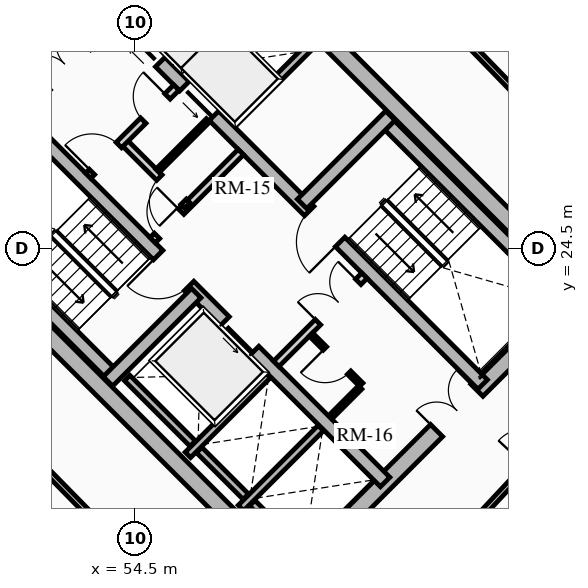
"""IFC4 building model, lengths in metres.
Left out: names, types, materials, properties, quantities, classifications, styles, units other than length and angle.
Written with IfcOpenShell. Run it as: python <this file> out.ifc"""

import sys

from ifc_helpers import new_model, si_unit, direction, frame, frame_2d, origin, place, context, subcontext, project, spatial, rectangle, extrude, source, transform, mapped, element, fill, save


model = new_model("IFC4")
c1 = context("Model", 3, precision=1e-05, world=origin(), true_north=direction((0.0, 1.0)))
c2 = subcontext(c1, "Body", "Model", "MODEL_VIEW")
j1 = project(units=[si_unit("LENGTHUNIT", "METRE"), si_unit("PLANEANGLEUNIT", "RADIAN")], contexts=[c1])
p1 = place(None, origin())
s1 = spatial("IfcSite", under=j1, at=p1, CompositionType="ELEMENT")
p2 = place(p1, origin())
s2 = spatial("IfcBuilding", under=s1, at=p2, CompositionType="ELEMENT")
p3 = place(p2, frame((0.0, 0.0, 75.97)))
s3 = spatial("IfcBuildingStorey", under=s2, at=p3, CompositionType="ELEMENT", Elevation=75.97)
for number, where, z_axis, x_axis in (
    (1, (58.737, 15.697, 0.0), (0.0, 0.0, 1.0), (-0.707, 0.707, 0.0)),
    (2, (66.303, 23.263, 0.0), (0.0, 0.0, 1.0), (-0.707, 0.707, 0.0)),
):
    element("IfcWall", number, at=place(p3, frame(where, z_axis=z_axis, x_axis=x_axis)), inside=s3, PredefinedType="SHEAR", context=c2, shape_type="SweptSolid", body=[
        extrude(rectangle(XDim=14.2, YDim=0.45, at=frame_2d((7.1, 0.0))), origin(), (0.0, 0.0, 1.0), 2.91),
    ])
p4 = place(p3, frame((58.578, 15.856, 0.0), z_axis=(0.0, 0.0, 1.0), x_axis=(0.707106781187, 0.707106781187, 0.0)))
e3 = element("IfcWall", 3, at=p4, inside=s3, PredefinedType="SHEAR", context=c2, shape_type="SweptSolid", body=[
    extrude(rectangle(XDim=10.7, YDim=0.45, at=frame_2d((5.35, 0.0))), origin(), (0.0, 0.0, 1.0), 2.91),
])
m1 = source(origin(), c2, "Body", "SweptSolid", [
    extrude(rectangle(XDim=1.5, YDim=2.02, at=frame_2d((0.75, 1.01))), frame((0.0, 0.235, 0.0), z_axis=(0.0, -1.0, 0.0), x_axis=(1.0, 0.0, 0.0)), (0.0, 0.0, 1.0), 0.47),
])
p5 = place(p4, frame((5.45, 0.0, 0.0)))
e4 = element("IfcOpeningElement", 4, at=p5, cuts=e3, PredefinedType="OPENING", context=c2, shape_type="MappedRepresentation", body=[
    mapped(m1, transform((0.0, 0.0, 0.0), x_axis=(1.0, 0.0, 0.0), y_axis=(0.0, 1.0, 0.0), z_axis=(0.0, 0.0, 1.0), scale=1.0)),
])
p6 = place(p3, frame((48.856, 25.578, 0.0), z_axis=(0.0, 0.0, 1.0), x_axis=(0.707106781187, 0.707106781187, 0.0)))
e5 = element("IfcWall", 5, at=p6, inside=s3, PredefinedType="SHEAR", context=c2, shape_type="SweptSolid", body=[
    extrude(rectangle(XDim=10.7, YDim=0.45, at=frame_2d((5.35, 0.0))), origin(), (0.0, 0.0, 1.0), 2.91),
])
p7 = place(p6, frame((4.6, 0.0, 0.0)))
e6 = element("IfcOpeningElement", 6, at=p7, cuts=e5, PredefinedType="OPENING", context=c2, shape_type="MappedRepresentation", body=[
    mapped(m1, transform((0.0, 0.0, 0.0), x_axis=(1.0, 0.0, 0.0), y_axis=(0.0, 1.0, 0.0), z_axis=(0.0, 0.0, 1.0), scale=1.0)),
])
p8 = place(p3, frame((61.078, 18.355, 0.0), z_axis=(0.0, 0.0, 1.0), x_axis=(-0.707106781187, 0.707106781187, 0.0)))
e7 = element("IfcWall", 7, at=p8, inside=s3, PredefinedType="SHEAR", context=c2, shape_type="SweptSolid", body=[
    extrude(rectangle(XDim=13.75, YDim=0.35, at=frame_2d((6.875, 0.0))), origin(), (0.0, 0.0, 1.0), 2.91),
])
m2 = source(origin(), c2, "Body", "SweptSolid", [
    extrude(rectangle(XDim=1.1, YDim=2.015, at=frame_2d((0.55, 1.007))), frame((0.0, 0.185, 0.0), z_axis=(0.0, -1.0, 0.0), x_axis=(1.0, 0.0, 0.0)), (0.0, 0.0, 1.0), 0.37),
])
p9 = place(p8, frame((4.875, 0.0, 0.0)))
e8 = element("IfcOpeningElement", 8, at=p9, cuts=e7, PredefinedType="OPENING", context=c2, shape_type="MappedRepresentation", body=[
    mapped(m2, transform((0.0, 0.0, 0.0), x_axis=(1.0, 0.0, 0.0), y_axis=(0.0, 1.0, 0.0), z_axis=(0.0, 0.0, 1.0), scale=1.0)),
])
m3 = source(origin(), c2, "Body", "SweptSolid", [
    extrude(rectangle(XDim=1.15, YDim=2.02, at=frame_2d((0.575, 1.01))), frame((0.0, 0.185, 0.0), z_axis=(0.0, -1.0, 0.0), x_axis=(1.0, 0.0, 0.0)), (0.0, 0.0, 1.0), 0.37),
])
p10 = place(p8, frame((7.295, 0.0, 0.0)))
e9 = element("IfcOpeningElement", 9, at=p10, cuts=e7, PredefinedType="OPENING", context=c2, shape_type="MappedRepresentation", body=[
    mapped(m3, transform((0.0, 0.0, 0.0), x_axis=(1.0, 0.0, 0.0), y_axis=(0.0, 1.0, 0.0), z_axis=(0.0, 0.0, 1.0), scale=1.0)),
])
p11 = place(p3, frame((63.645, 20.922, 0.0), z_axis=(0.0, 0.0, 1.0), x_axis=(-0.707106781187, 0.707106781187, 0.0)))
e10 = element("IfcWall", 10, at=p11, inside=s3, PredefinedType="SHEAR", context=c2, shape_type="SweptSolid", body=[
    extrude(rectangle(XDim=13.75, YDim=0.35, at=frame_2d((6.875, 0.0))), origin(), (0.0, 0.0, 1.0), 2.91),
])
p12 = place(p11, frame((10.0, 0.0, 0.0)))
e11 = element("IfcOpeningElement", 11, at=p12, cuts=e10, PredefinedType="OPENING", context=c2, shape_type="MappedRepresentation", body=[
    mapped(m2, transform((0.0, 0.0, 0.0), x_axis=(1.0, 0.0, 0.0), y_axis=(0.0, 1.0, 0.0), z_axis=(0.0, 0.0, 1.0), scale=1.0)),
])
p13 = place(p11, frame((12.0, 0.0, 0.0)))
e12 = element("IfcOpeningElement", 12, at=p13, cuts=e10, PredefinedType="OPENING", context=c2, shape_type="MappedRepresentation", body=[
    mapped(m2, transform((0.0, 0.0, 0.0), x_axis=(1.0, 0.0, 0.0), y_axis=(0.0, 1.0, 0.0), z_axis=(0.0, 0.0, 1.0), scale=1.0)),
])
p14 = place(p11, frame((5.305, 0.0, 0.0)))
e13 = element("IfcOpeningElement", 13, at=p14, cuts=e10, PredefinedType="OPENING", context=c2, shape_type="MappedRepresentation", body=[
    mapped(m3, transform((0.0, 0.0, 0.0), x_axis=(1.0, 0.0, 0.0), y_axis=(0.0, 1.0, 0.0), z_axis=(0.0, 0.0, 1.0), scale=1.0)),
])
p15 = place(p3, frame((53.922, 21.141, 0.0), z_axis=(0.0, 0.0, 1.0), x_axis=(-0.707088616009, 0.707124945897, 0.0)))
e14 = element("IfcWall", 14, at=p15, inside=s3, PredefinedType="SHEAR", context=c2, shape_type="SweptSolid", body=[
    extrude(rectangle(XDim=6.72, YDim=0.35, at=frame_2d((3.36, 0.0))), origin(), (0.0, 0.0, 1.0), 2.91),
])
p16 = place(p3, frame((53.784, 21.003, 0.0), z_axis=(0.0, 0.0, 1.0), x_axis=(0.707106781187, 0.707106781187, 0.0)))
e15 = element("IfcWall", 15, at=p16, inside=s3, PredefinedType="SHEAR", context=c2, shape_type="SweptSolid", body=[
    extrude(rectangle(XDim=3.285, YDim=0.35, at=frame_2d((1.643, 0.0))), origin(), (0.0, 0.0, 1.0), 2.91),
])
p17 = place(p3, frame((65.83, 23.107, 0.0), z_axis=(0.0, 0.0, 1.0), x_axis=(-0.707088616009, 0.707124945897, 0.0)))
e16 = element("IfcWall", 16, at=p17, inside=s3, PredefinedType="SHEAR", context=c2, shape_type="SweptSolid", body=[
    extrude(rectangle(XDim=6.72, YDim=0.35, at=frame_2d((3.36, 0.0))), origin(), (0.0, 0.0, 1.0), 2.91),
])
p18 = place(p3, frame((58.893, 25.674, 0.0), z_axis=(0.0, 0.0, 1.0), x_axis=(0.707106781187, 0.707106781187, 0.0)))
e17 = element("IfcWall", 17, at=p18, inside=s3, PredefinedType="SHEAR", context=c2, shape_type="SweptSolid", body=[
    extrude(rectangle(XDim=3.285, YDim=0.35, at=frame_2d((1.643, 0.0))), origin(), (0.0, 0.0, 1.0), 2.91),
])
p19 = place(p3, frame((55.888, 19.069, 0.0), z_axis=(0.0, 0.0, 1.0), x_axis=(0.707106781187, 0.707106781187, 0.0)))
e18 = element("IfcWall", 18, at=p19, inside=s3, PredefinedType="SHEAR", context=c2, shape_type="SweptSolid", body=[
    extrude(rectangle(XDim=2.97, YDim=0.2, at=frame_2d((1.485, 0.0))), origin(), (0.0, 0.0, 1.0), 2.91),
])
p20 = place(p3, frame((56.015, 19.366, 0.0), z_axis=(0.0, 0.0, 1.0), x_axis=(-0.707106781187, 0.707106781187, 0.0)))
e19 = element("IfcWall", 19, at=p20, inside=s3, PredefinedType="SHEAR", context=c2, shape_type="SweptSolid", body=[
    extrude(rectangle(XDim=2.44, YDim=0.2, at=frame_2d((1.22, 0.0))), origin(), (0.0, 0.0, 1.0), 2.91),
])
p21 = place(p3, frame((57.284, 17.673, 0.0), z_axis=(0.0, 0.0, 1.0), x_axis=(0.707147878904, 0.70706568108, 0.0)))
e20 = element("IfcWall", 20, at=p21, inside=s3, PredefinedType="SHEAR", context=c2, shape_type="SweptSolid", body=[
    extrude(rectangle(XDim=2.97, YDim=0.2, at=frame_2d((1.485, 0.0))), origin(), (0.0, 0.0, 1.0), 2.91),
])
p22 = place(p3, frame((57.412, 17.97, 0.0), z_axis=(0.0, 0.0, 1.0), x_axis=(-0.707106781187, 0.707106781187, 0.0)))
e21 = element("IfcWall", 21, at=p22, inside=s3, PredefinedType="SHEAR", context=c2, shape_type="SweptSolid", body=[
    extrude(rectangle(XDim=1.735, YDim=0.2, at=frame_2d((0.867, 0.0))), origin(), (0.0, 0.0, 1.0), 2.91),
])
p23 = place(p3, frame((58.737, 16.644, 0.0), z_axis=(0.0, 0.0, 1.0), x_axis=(-0.707032117043, 0.707181437447, 0.0)))
e22 = element("IfcWall", 22, at=p23, inside=s3, PredefinedType="SHEAR", context=c2, shape_type="SweptSolid", body=[
    extrude(rectangle(XDim=1.635, YDim=0.2, at=frame_2d((0.817, 0.0))), origin(), (0.0, 0.0, 1.0), 2.91),
])
p24 = place(p3, frame((57.062, 27.781, 0.0), z_axis=(0.0, 0.0, 1.0), x_axis=(0.707106781187, 0.707106781187, 0.0)))
e23 = element("IfcWall", 23, at=p24, inside=s3, PredefinedType="SHEAR", context=c2, shape_type="SweptSolid", body=[
    extrude(rectangle(XDim=2.97, YDim=0.2, at=frame_2d((1.485, 0.0))), origin(), (0.0, 0.0, 1.0), 2.91),
])
p25 = place(p3, frame((55.615, 29.227, 0.0), z_axis=(0.0, 0.0, 1.0), x_axis=(0.707147878904, 0.70706568108, 0.0)))
e24 = element("IfcWall", 24, at=p25, inside=s3, PredefinedType="SHEAR", context=c2, shape_type="SweptSolid", body=[
    extrude(rectangle(XDim=2.97, YDim=0.2, at=frame_2d((1.485, 0.0))), origin(), (0.0, 0.0, 1.0), 2.91),
])
p26 = place(p3, frame((58.214, 21.467, 0.0), z_axis=(0.0, 0.0, 1.0), x_axis=(0.707106781187, 0.707106781187, 0.0)))
e25 = element("IfcWall", 25, at=p26, inside=s3, PredefinedType="PARTITIONING", context=c2, shape_type="SweptSolid", body=[
    extrude(rectangle(XDim=3.28, YDim=0.2, at=frame_2d((1.64, 0.0))), origin(), (0.0, 0.0, 1.0), 2.655),
])
m4 = source(origin(), c2, "Body", "SweptSolid", [
    extrude(rectangle(XDim=1.5, YDim=2.02, at=frame_2d((0.75, 1.01))), frame((0.0, 0.11, 0.0), z_axis=(0.0, -1.0, 0.0), x_axis=(1.0, 0.0, 0.0)), (0.0, 0.0, 1.0), 0.22),
])
p27 = place(p26, frame((1.55, 0.0, 0.0)))
e26 = element("IfcOpeningElement", 26, at=p27, cuts=e25, PredefinedType="OPENING", context=c2, shape_type="MappedRepresentation", body=[
    mapped(m4, transform((0.0, 0.0, 0.0), x_axis=(1.0, 0.0, 0.0), y_axis=(0.0, 1.0, 0.0), z_axis=(0.0, 0.0, 1.0), scale=1.0)),
])
p28 = place(p3, frame((54.961, 24.719, 0.0), z_axis=(0.0, 0.0, 1.0), x_axis=(0.707106781187, 0.707106781187, 0.0)))
e27 = element("IfcWall", 27, at=p28, inside=s3, PredefinedType="PARTITIONING", context=c2, shape_type="SweptSolid", body=[
    extrude(rectangle(XDim=3.28, YDim=0.2, at=frame_2d((1.64, 0.0))), origin(), (0.0, 0.0, 1.0), 2.655),
])
m5 = source(origin(), c2, "Body", "SweptSolid", [
    extrude(rectangle(XDim=0.9, YDim=2.005, at=frame_2d((0.45, 1.002))), frame((0.0, 0.11, 0.0), z_axis=(0.0, -1.0, 0.0), x_axis=(1.0, 0.0, 0.0)), (0.0, 0.0, 1.0), 0.22),
])
p29 = place(p28, frame((0.16, 0.0, 0.0)))
e28 = element("IfcOpeningElement", 28, at=p29, cuts=e27, PredefinedType="OPENING", context=c2, shape_type="MappedRepresentation", body=[
    mapped(m5, transform((0.0, 0.0, 0.0), x_axis=(1.0, 0.0, 0.0), y_axis=(0.0, 1.0, 0.0), z_axis=(0.0, 0.0, 1.0), scale=1.0)),
])
p30 = place(p3, frame((55.874, 25.631, 0.0), z_axis=(0.0, 0.0, 1.0), x_axis=(-0.707157639372, 0.707055919343, 0.0)))
e29 = element("IfcWall", 29, at=p30, inside=s3, PredefinedType="PARTITIONING", context=c2, shape_type="SweptSolid", body=[
    extrude(rectangle(XDim=2.4, YDim=0.2, at=frame_2d((1.2, 0.0))), origin(), (0.0, 0.0, 1.0), 2.655),
])
p31 = place(p30, frame((0.14, 0.0, 0.0)))
e30 = element("IfcOpeningElement", 30, at=p31, cuts=e29, PredefinedType="OPENING", context=c2, shape_type="MappedRepresentation", body=[
    mapped(m5, transform((0.0, 0.0, 0.0), x_axis=(1.0, 0.0, 0.0), y_axis=(0.0, 1.0, 0.0), z_axis=(0.0, 0.0, 1.0), scale=1.0)),
])
p32 = place(p3, frame((53.264, 26.416, 0.0), z_axis=(0.0, 0.0, 1.0), x_axis=(0.707106781187, 0.707106781187, 0.0)))
e31 = element("IfcWall", 31, at=p32, inside=s3, PredefinedType="PARTITIONING", context=c2, shape_type="SweptSolid", body=[
    extrude(rectangle(XDim=3.28, YDim=0.2, at=frame_2d((1.64, 0.0))), origin(), (0.0, 0.0, 1.0), 2.655),
])
m6 = source(origin(), c2, "Body", "SweptSolid", [
    extrude(rectangle(XDim=1.0, YDim=2.015, at=frame_2d((0.5, 1.007))), frame((0.0, 0.11, 0.0), z_axis=(0.0, -1.0, 0.0), x_axis=(1.0, 0.0, 0.0)), (0.0, 0.0, 1.0), 0.22),
])
p33 = place(p32, frame((0.14, 0.0, 0.0)))
e32 = element("IfcOpeningElement", 32, at=p33, cuts=e31, PredefinedType="OPENING", context=c2, shape_type="MappedRepresentation", body=[
    mapped(m6, transform((0.0, 0.0, 0.0), x_axis=(1.0, 0.0, 0.0), y_axis=(0.0, 1.0, 0.0), z_axis=(0.0, 0.0, 1.0), scale=1.0)),
])
p34 = place(p32, frame((2.05, 0.0, 0.0)))
e33 = element("IfcOpeningElement", 33, at=p34, cuts=e31, PredefinedType="OPENING", context=c2, shape_type="MappedRepresentation", body=[
    mapped(m5, transform((0.0, 0.0, 0.0), x_axis=(1.0, 0.0, 0.0), y_axis=(0.0, 1.0, 0.0), z_axis=(0.0, 0.0, 1.0), scale=1.0)),
])
p35 = place(p3, frame((60.448, 20.915, 0.0), z_axis=(0.0, 0.0, 1.0), x_axis=(-0.707106781187, 0.707106781187, 0.0)))
e34 = element("IfcWall", 34, at=p35, inside=s3, PredefinedType="PARTITIONING", context=c2, shape_type="SweptSolid", body=[
    extrude(rectangle(XDim=1.87, YDim=0.125, at=frame_2d((0.935, 0.0))), origin(), (0.0, 0.0, 1.0), 2.655),
])
m7 = source(origin(), c2, "Body", "SweptSolid", [
    extrude(rectangle(XDim=0.9, YDim=2.005, at=frame_2d((0.45, 1.002))), frame((0.0, 0.073, 0.0), z_axis=(0.0, -1.0, 0.0), x_axis=(1.0, 0.0, 0.0)), (0.0, 0.0, 1.0), 0.145),
])
p36 = place(p35, frame((0.45, 0.0, 0.0)))
e35 = element("IfcOpeningElement", 35, at=p36, cuts=e34, PredefinedType="OPENING", context=c2, shape_type="MappedRepresentation", body=[
    mapped(m7, transform((0.0, 0.0, 0.0), x_axis=(1.0, 0.0, 0.0), y_axis=(0.0, 1.0, 0.0), z_axis=(0.0, 0.0, 1.0), scale=1.0)),
])
p37 = place(p3, frame((59.643, 20.066, 0.0), z_axis=(0.0, 0.0, 1.0), x_axis=(0.707106781187, 0.707106781187, 0.0)))
e36 = element("IfcWall", 36, at=p37, inside=s3, PredefinedType="PARTITIONING", context=c2, shape_type="SweptSolid", body=[
    extrude(rectangle(XDim=1.1, YDim=0.125, at=frame_2d((0.55, 0.0))), origin(), (0.0, 0.0, 1.0), 2.655),
])
p38 = place(p3, frame((55.089, 26.543, 0.0), z_axis=(0.0, 0.0, 1.0), x_axis=(0.707106781187, 0.707106781187, 0.0)))
e37 = element("IfcWall", 37, at=p38, inside=s3, PredefinedType="PARTITIONING", context=c2, shape_type="SweptSolid", body=[
    extrude(rectangle(XDim=1.88, YDim=0.125, at=frame_2d((0.94, 0.0))), origin(), (0.0, 0.0, 1.0), 2.655),
])
p39 = place(p3, frame((51.914, 18.914, 0.0), z_axis=(0.0, 0.0, 1.0), x_axis=(0.6999614951, -0.71418058317, 0.0)))
e38 = element("IfcWall", 38, at=p39, inside=s3, PredefinedType="PARTITIONING", context=c2, shape_type="SweptSolid", body=[
    extrude(rectangle(XDim=6.13, YDim=0.15, at=frame_2d((3.065, 0.0))), origin(), (0.0, 0.0, 1.0), 2.225),
])
m8 = source(origin(), c2, "Body", "SweptSolid", [
    extrude(rectangle(XDim=1.05, YDim=2.015, at=frame_2d((0.525, 1.007))), frame((0.0, 0.085, 0.0), z_axis=(0.0, -1.0, 0.0), x_axis=(1.0, 0.0, 0.0)), (0.0, 0.0, 1.0), 0.17),
])
p40 = place(p39, frame((2.54, 0.0, 0.0)))
e39 = element("IfcOpeningElement", 39, at=p40, cuts=e38, PredefinedType="OPENING", context=c2, shape_type="MappedRepresentation", body=[
    mapped(m8, transform((0.0, 0.0, 0.0), x_axis=(1.0, 0.0, 0.0), y_axis=(0.0, 1.0, 0.0), z_axis=(0.0, 0.0, 1.0), scale=1.0)),
])
p41 = place(p3, frame((62.867, 16.702, 0.0), z_axis=(0.0, 0.0, 1.0), x_axis=(0.682449206191, 0.73093302085, 0.0)))
e40 = element("IfcWall", 40, at=p41, inside=s3, PredefinedType="PARTITIONING", context=c2, shape_type="SweptSolid", body=[
    extrude(rectangle(XDim=6.642, YDim=0.15, at=frame_2d((3.321, 0.0))), origin(), (0.0, 0.0, 1.0), 2.225),
])
m9 = source(origin(), c2, "Body", "SweptSolid", [
    extrude(rectangle(XDim=1.0, YDim=2.015, at=frame_2d((0.5, 1.007))), frame((0.0, 0.085, 0.0), z_axis=(0.0, -1.0, 0.0), x_axis=(1.0, 0.0, 0.0)), (0.0, 0.0, 1.0), 0.17),
])
p42 = place(p41, frame((2.821, 0.0, 0.0)))
e41 = element("IfcOpeningElement", 41, at=p42, cuts=e40, PredefinedType="OPENING", context=c2, shape_type="MappedRepresentation", body=[
    mapped(m9, transform((0.0, 0.0, 0.0), x_axis=(1.0, 0.0, 0.0), y_axis=(0.0, 1.0, 0.0), z_axis=(0.0, 0.0, 1.0), scale=1.0)),
])
p43 = place(p3, frame((67.247, 25.802, 0.0), z_axis=(0.0, 0.0, 1.0), x_axis=(-0.696771261687, 0.71729339108, 0.0)))
e42 = element("IfcWall", 42, at=p43, inside=s3, PredefinedType="PARTITIONING", context=c2, shape_type="SweptSolid", body=[
    extrude(rectangle(XDim=5.972, YDim=0.15, at=frame_2d((2.986, 0.0))), origin(), (0.0, 0.0, 1.0), 2.655),
])
m10 = source(origin(), c2, "Body", "SweptSolid", [
    extrude(rectangle(XDim=1.1, YDim=2.015, at=frame_2d((0.55, 1.007))), frame((0.0, 0.025, 0.0), z_axis=(0.0, -1.0, 0.0), x_axis=(1.0, 0.0, 0.0)), (0.0, 0.0, 1.0), 0.05),
])
p44 = place(p9, origin())
e43 = element("IfcDoor", 43, at=p44, inside=s3, OperationType="SLIDING_TO_LEFT", PredefinedType="DOOR", context=c2, shape_type="MappedRepresentation", body=[
    mapped(m10, transform((0.0, 0.0, 0.0), x_axis=(1.0, 0.0, 0.0), y_axis=(0.0, 1.0, 0.0), z_axis=(0.0, 0.0, 1.0), scale=1.0)),
])
fill(e8, e43)
p45 = place(p12, origin())
e44 = element("IfcDoor", 44, at=p45, inside=s3, OperationType="SLIDING_TO_LEFT", PredefinedType="DOOR", context=c2, shape_type="MappedRepresentation", body=[
    mapped(m10, transform((0.0, 0.0, 0.0), x_axis=(1.0, 0.0, 0.0), y_axis=(0.0, 1.0, 0.0), z_axis=(0.0, 0.0, 1.0), scale=1.0)),
])
fill(e11, e44)
p46 = place(p13, origin())
e45 = element("IfcDoor", 45, at=p46, inside=s3, OperationType="SLIDING_TO_RIGHT", PredefinedType="DOOR", context=c2, shape_type="MappedRepresentation", body=[
    mapped(m10, transform((0.0, 0.0, 0.0), x_axis=(1.0, 0.0, 0.0), y_axis=(0.0, 1.0, 0.0), z_axis=(0.0, 0.0, 1.0), scale=1.0)),
])
fill(e12, e45)
m11 = source(origin(), c2, "Body", "SweptSolid", [
    extrude(rectangle(XDim=1.15, YDim=2.02, at=frame_2d((0.575, 1.01))), frame((0.0, 0.025, 0.0), z_axis=(0.0, -1.0, 0.0), x_axis=(1.0, 0.0, 0.0)), (0.0, 0.0, 1.0), 0.05),
])
p47 = place(p10, origin())
e46 = element("IfcDoor", 46, at=p47, inside=s3, OperationType="SINGLE_SWING_RIGHT", PredefinedType="DOOR", context=c2, shape_type="MappedRepresentation", body=[
    mapped(m11, transform((0.0, 0.0, 0.0), x_axis=(1.0, 0.0, 0.0), y_axis=(0.0, 1.0, 0.0), z_axis=(0.0, 0.0, 1.0), scale=1.0)),
])
fill(e9, e46)
p48 = place(p14, origin())
e47 = element("IfcDoor", 47, at=p48, inside=s3, OperationType="SINGLE_SWING_LEFT", PredefinedType="DOOR", context=c2, shape_type="MappedRepresentation", body=[
    mapped(m11, transform((0.0, 0.0, 0.0), x_axis=(1.0, 0.0, 0.0), y_axis=(0.0, 1.0, 0.0), z_axis=(0.0, 0.0, 1.0), scale=1.0)),
])
fill(e13, e47)
m12 = source(origin(), c2, "Body", "SweptSolid", [
    extrude(rectangle(XDim=1.5, YDim=2.02, at=frame_2d((0.75, 1.01))), frame((0.0, 0.025, 0.0), z_axis=(0.0, -1.0, 0.0), x_axis=(1.0, 0.0, 0.0)), (0.0, 0.0, 1.0), 0.05),
])
p49 = place(p7, origin())
e48 = element("IfcDoor", 48, at=p49, inside=s3, OperationType="DOUBLE_DOOR_SINGLE_SWING", PredefinedType="DOOR", context=c2, shape_type="MappedRepresentation", body=[
    mapped(m12, transform((0.0, 0.0, 0.0), x_axis=(1.0, 0.0, 0.0), y_axis=(0.0, 1.0, 0.0), z_axis=(0.0, 0.0, 1.0), scale=1.0)),
])
fill(e6, e48)
p50 = place(p5, origin())
e49 = element("IfcDoor", 49, at=p50, inside=s3, OperationType="DOUBLE_DOOR_SINGLE_SWING", PredefinedType="DOOR", context=c2, shape_type="MappedRepresentation", body=[
    mapped(m12, transform((0.0, 0.0, 0.0), x_axis=(1.0, 0.0, 0.0), y_axis=(0.0, 1.0, 0.0), z_axis=(0.0, 0.0, 1.0), scale=1.0)),
])
fill(e4, e49)
p51 = place(p27, origin())
e50 = element("IfcDoor", 50, at=p51, inside=s3, OperationType="DOUBLE_DOOR_SINGLE_SWING", PredefinedType="DOOR", context=c2, shape_type="MappedRepresentation", body=[
    mapped(m12, transform((0.0, 0.0, 0.0), x_axis=(1.0, 0.0, 0.0), y_axis=(0.0, 1.0, 0.0), z_axis=(0.0, 0.0, 1.0), scale=1.0)),
])
fill(e26, e50)
m13 = source(origin(), c2, "Body", "SweptSolid", [
    extrude(rectangle(XDim=0.9, YDim=2.005, at=frame_2d((0.45, 1.002))), frame((0.0, 0.025, 0.0), z_axis=(0.0, -1.0, 0.0), x_axis=(1.0, 0.0, 0.0)), (0.0, 0.0, 1.0), 0.05),
])
p52 = place(p29, origin())
e51 = element("IfcDoor", 51, at=p52, inside=s3, OperationType="SINGLE_SWING_RIGHT", PredefinedType="DOOR", context=c2, shape_type="MappedRepresentation", body=[
    mapped(m13, transform((0.0, 0.0, 0.0), x_axis=(1.0, 0.0, 0.0), y_axis=(0.0, 1.0, 0.0), z_axis=(0.0, 0.0, 1.0), scale=1.0)),
])
fill(e28, e51)
m14 = source(origin(), c2, "Body", "SweptSolid", [
    extrude(rectangle(XDim=1.0, YDim=2.015, at=frame_2d((0.5, 1.007))), frame((0.0, 0.025, 0.0), z_axis=(0.0, -1.0, 0.0), x_axis=(1.0, 0.0, 0.0)), (0.0, 0.0, 1.0), 0.05),
])
p53 = place(p33, origin())
e52 = element("IfcDoor", 52, at=p53, inside=s3, OperationType="SINGLE_SWING_LEFT", PredefinedType="DOOR", context=c2, shape_type="MappedRepresentation", body=[
    mapped(m14, transform((0.0, 0.0, 0.0), x_axis=(1.0, 0.0, 0.0), y_axis=(0.0, 1.0, 0.0), z_axis=(0.0, 0.0, 1.0), scale=1.0)),
])
fill(e32, e52)
p54 = place(p36, origin())
e53 = element("IfcDoor", 53, at=p54, inside=s3, OperationType="SINGLE_SWING_RIGHT", PredefinedType="DOOR", context=c2, shape_type="MappedRepresentation", body=[
    mapped(m13, transform((0.0, 0.0, 0.0), x_axis=(1.0, 0.0, 0.0), y_axis=(0.0, 1.0, 0.0), z_axis=(0.0, 0.0, 1.0), scale=1.0)),
])
fill(e35, e53)
p55 = place(p31, origin())
e54 = element("IfcDoor", 54, at=p55, inside=s3, OperationType="SINGLE_SWING_LEFT", PredefinedType="DOOR", context=c2, shape_type="MappedRepresentation", body=[
    mapped(m13, transform((0.0, 0.0, 0.0), x_axis=(1.0, 0.0, 0.0), y_axis=(0.0, 1.0, 0.0), z_axis=(0.0, 0.0, 1.0), scale=1.0)),
])
fill(e30, e54)
p56 = place(p34, origin())
e55 = element("IfcDoor", 55, at=p56, inside=s3, OperationType="SINGLE_SWING_RIGHT", PredefinedType="DOOR", context=c2, shape_type="MappedRepresentation", body=[
    mapped(m13, transform((0.0, 0.0, 0.0), x_axis=(1.0, 0.0, 0.0), y_axis=(0.0, 1.0, 0.0), z_axis=(0.0, 0.0, 1.0), scale=1.0)),
])
fill(e33, e55)
save(model, sys.argv[1])
